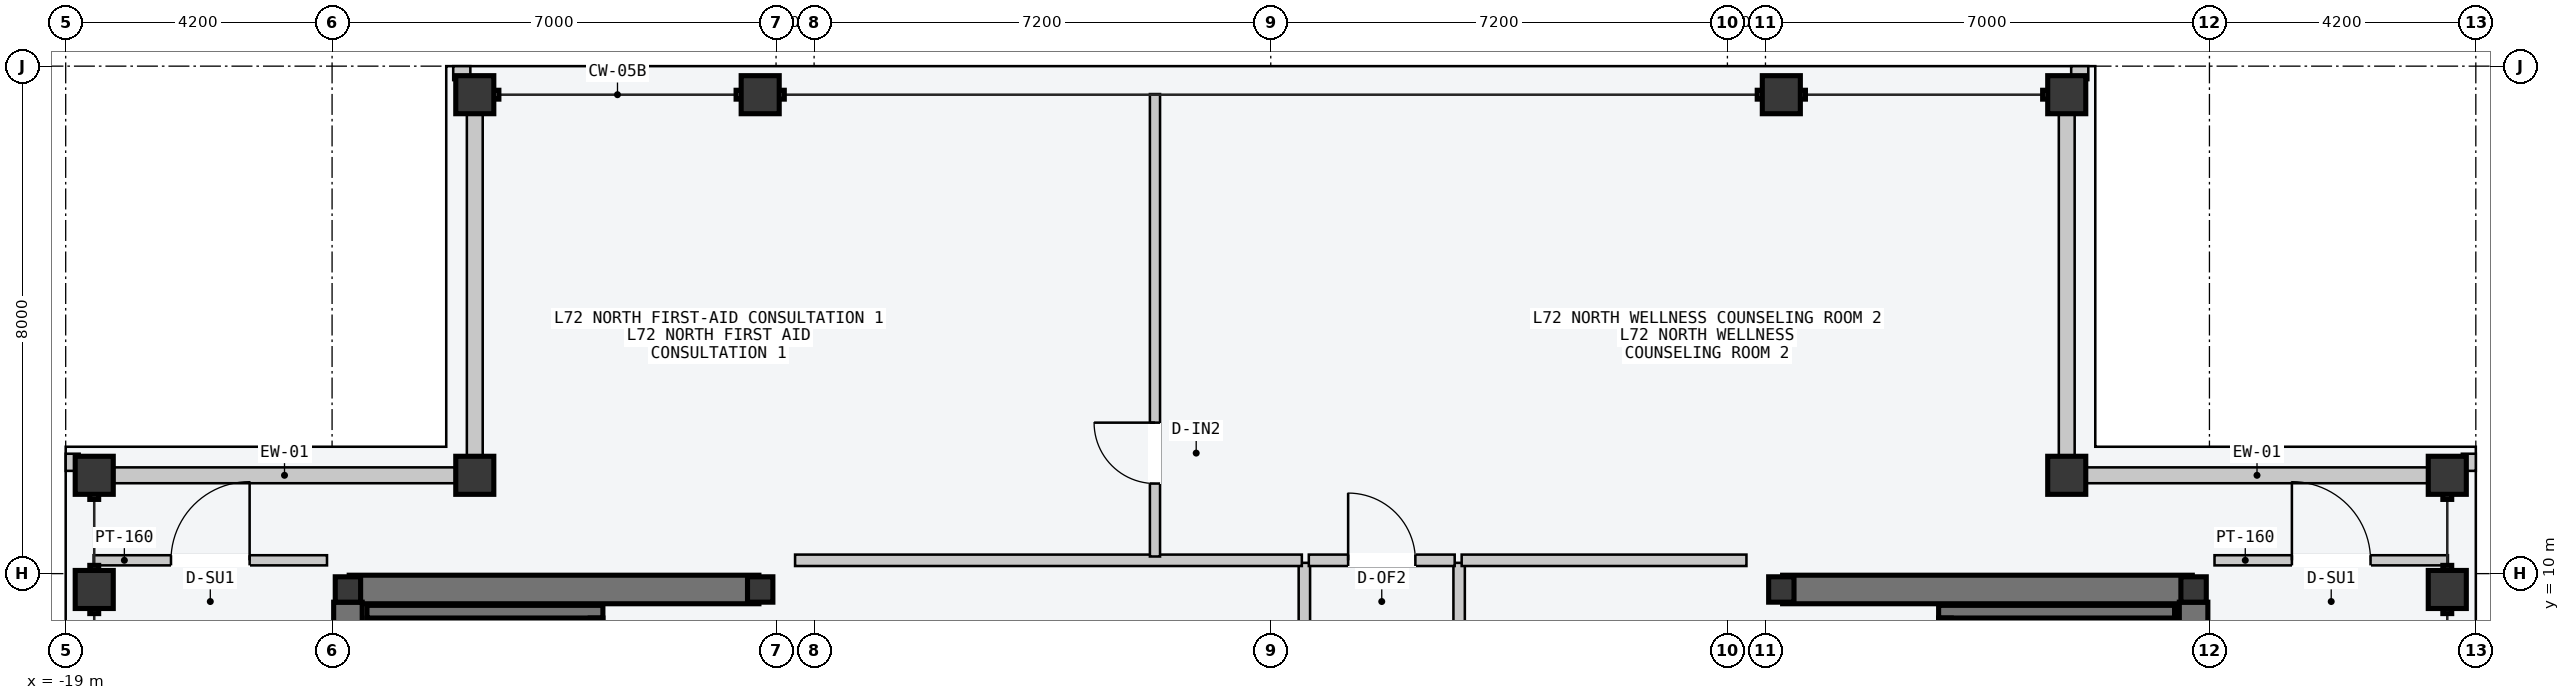
"""IFC4 building model, lengths in metres.
Left out: names, types, materials, properties, quantities, classifications, styles, units other than length and angle.
Written with IfcOpenShell. Run it as: python <this file> out.ifc"""

import sys

from ifc_helpers import new_model, si_unit, direction, frame, frame_2d, origin, origin_2d, place, context, subcontext, project, spatial, rectangle, hollow_rectangle, i_section, extrude, element, fill, save


model = new_model("IFC4")
c1 = context("Model", 3, precision=1e-05, world=origin(), true_north=direction((0.0, 1.0)))
c2 = subcontext(c1, "Body", "Model", "MODEL_VIEW")
j1 = project(units=[si_unit("LENGTHUNIT", "METRE"), si_unit("PLANEANGLEUNIT", "RADIAN")], contexts=[c1])
p1 = place(None, origin())
s1 = spatial("IfcSite", under=j1, at=p1, CompositionType="ELEMENT")
p2 = place(p1, origin())
s2 = spatial("IfcBuilding", under=s1, at=p2, CompositionType="ELEMENT")
p3 = place(p2, frame((0.0, 0.0, 272.4)))
s3 = spatial("IfcBuildingStorey", under=s2, at=p3, CompositionType="ELEMENT", Elevation=272.4)
p4 = place(p3, frame((-14.53, 9.75, -0.2), z_axis=(0.0, 0.0, 1.0), x_axis=(1.0, 0.0, 0.0)))
e1 = element("IfcWall", 1, at=p4, inside=s3, PredefinedType="SHEAR", context=c2, shape_type="SweptSolid", body=[
    extrude(rectangle(XDim=6.46, YDim=0.45, at=frame_2d((3.23, 0.0))), origin(), (0.0, 0.0, 1.0), 3.6),
])
p5 = place(p3, frame((-14.55, 0.2, -0.2), z_axis=(0.0, 0.0, 1.0), x_axis=(0.0, 1.0, 0.0)))
e2 = element("IfcWall", 2, at=p5, inside=s3, PredefinedType="SHEAR", context=c2, shape_type="SweptSolid", body=[
    extrude(rectangle(XDim=9.35, YDim=0.45, at=frame_2d((4.675, 0.0))), origin(), (0.0, 0.0, 1.0), 3.6),
])
p6 = place(p3, frame((8.07, 9.75, -0.2), z_axis=(0.0, 0.0, 1.0), x_axis=(1.0, 0.0, 0.0)))
e3 = element("IfcWall", 3, at=p6, inside=s3, PredefinedType="SHEAR", context=c2, shape_type="SweptSolid", body=[
    extrude(rectangle(XDim=6.46, YDim=0.45, at=frame_2d((3.23, 0.0))), origin(), (0.0, 0.0, 1.0), 3.6),
])
p7 = place(p3, frame((14.55, 0.2, -0.2), z_axis=(0.0, 0.0, 1.0), x_axis=(0.0, 1.0, 0.0)))
e4 = element("IfcWall", 4, at=p7, inside=s3, PredefinedType="SHEAR", context=c2, shape_type="SweptSolid", body=[
    extrude(rectangle(XDim=9.35, YDim=0.45, at=frame_2d((4.675, 0.0))), origin(), (0.0, 0.0, 1.0), 3.6),
])
for number, where, z_axis, x_axis in (
    (5, (-14.15, 1.5, -0.2), (0.0, 0.0, 1.0), (0.0, 1.0, 0.0)),
    (6, (14.15, 1.5, -0.2), (0.0, 0.0, 1.0), (0.0, 1.0, 0.0)),
):
    element("IfcWall", number, at=place(p3, frame(where, z_axis=z_axis, x_axis=x_axis)), inside=s3, PredefinedType="SOLIDWALL", context=c2, shape_type="SweptSolid", body=[
        extrude(rectangle(XDim=7.8, YDim=0.2, at=frame_2d((3.9, 0.0))), origin(), (0.0, 0.0, 1.0), 3.6),
    ])
p8 = place(p3, frame((-14.25, 9.4, -0.2), z_axis=(0.0, 0.0, 1.0), x_axis=(1.0, 0.0, 0.0)))
e7 = element("IfcWall", 7, at=p8, inside=s3, PredefinedType="SOLIDWALL", context=c2, shape_type="SweptSolid", body=[
    extrude(rectangle(XDim=3.72, YDim=0.2, at=frame_2d((1.86, 0.0))), origin(), (0.0, 0.0, 1.0), 3.6),
])
p9 = place(p3, frame((-10.63, 1.5, -0.2), z_axis=(0.0, 0.0, 1.0), x_axis=(0.0, 1.0, 0.0)))
e8 = element("IfcWall", 8, at=p9, inside=s3, PredefinedType="SOLIDWALL", context=c2, shape_type="SweptSolid", body=[
    extrude(rectangle(XDim=7.8, YDim=0.2, at=frame_2d((3.9, 0.0))), origin(), (0.0, 0.0, 1.0), 3.6),
])
p10 = place(p3, frame((10.53, 9.4, -0.2), z_axis=(0.0, 0.0, 1.0), x_axis=(1.0, 0.0, 0.0)))
e9 = element("IfcWall", 9, at=p10, inside=s3, PredefinedType="SOLIDWALL", context=c2, shape_type="SweptSolid", body=[
    extrude(rectangle(XDim=3.72, YDim=0.2, at=frame_2d((1.86, 0.0))), origin(), (0.0, 0.0, 1.0), 3.6),
])
p11 = place(p3, frame((10.63, 1.5, -0.2), z_axis=(0.0, 0.0, 1.0), x_axis=(0.0, 1.0, 0.0)))
e10 = element("IfcWall", 10, at=p11, inside=s3, PredefinedType="SOLIDWALL", context=c2, shape_type="SweptSolid", body=[
    extrude(rectangle(XDim=7.8, YDim=0.2, at=frame_2d((3.9, 0.0))), origin(), (0.0, 0.0, 1.0), 3.6),
])
for number, where, z_axis, x_axis in (
    (11, (-14.55, 9.75, 0.0), (0.0, 0.0, 1.0), (1.0, 0.0, 0.0)),
    (12, (-8.05, 9.75, 0.0), (0.0, 0.0, 1.0), (1.0, 0.0, 0.0)),
    (13, (8.05, 9.75, 0.0), (0.0, 0.0, 1.0), (1.0, 0.0, 0.0)),
    (14, (14.55, 9.75, 0.0), (0.0, 0.0, 1.0), (1.0, 0.0, 0.0)),
):
    element("IfcColumn", number, at=place(p3, frame(where, z_axis=z_axis, x_axis=x_axis)), inside=s3, PredefinedType="COLUMN", context=c2, shape_type="SweptSolid", body=[
        extrude(i_section(OverallWidth=0.4, OverallDepth=0.4, WebThickness=0.013, FlangeThickness=0.021, at=origin_2d()), origin(), (0.0, 0.0, 1.0), 3.6),
    ])
for number, where, z_axis, x_axis in (
    (15, (-12.55, 17.55, 0.0), (0.0, 0.0, 1.0), (1.0, 0.0, 0.0)),
    (16, (-8.05, 17.55, 0.0), (0.0, 0.0, 1.0), (1.0, 0.0, 0.0)),
    (17, (8.05, 17.55, 0.0), (0.0, 0.0, 1.0), (1.0, 0.0, 0.0)),
    (18, (12.55, 17.55, 0.0), (0.0, 0.0, 1.0), (1.0, 0.0, 0.0)),
    (19, (-18.55, 9.75, 0.0), (0.0, 0.0, 1.0), (0.0, 1.0, 0.0)),
    (20, (-18.55, 11.55, 0.0), (0.0, 0.0, 1.0), (0.0, 1.0, 0.0)),
    (21, (18.55, 9.75, 0.0), (0.0, 0.0, 1.0), (0.0, 1.0, 0.0)),
    (22, (18.55, 11.55, 0.0), (0.0, 0.0, 1.0), (0.0, 1.0, 0.0)),
    (23, (-12.55, 11.55, 0.0), (0.0, 0.0, 1.0), (1.0, 0.0, 0.0)),
    (24, (12.55, 11.55, 0.0), (0.0, 0.0, 1.0), (1.0, 0.0, 0.0)),
):
    element("IfcColumn", number, at=place(p3, frame(where, z_axis=z_axis, x_axis=x_axis)), inside=s3, PredefinedType="COLUMN", context=c2, shape_type="SweptSolid", body=[
        extrude(hollow_rectangle(XDim=0.6, YDim=0.6, WallThickness=0.025, at=origin_2d()), origin(), (0.0, 0.0, 1.0), 3.6),
    ])
for number, where, z_axis, x_axis in (
    (25, (-18.24, 11.55, 0.0), (0.0, 0.0, 1.0), (1.0, 0.0, 0.0)),
    (26, (-12.55, 11.86, 0.0), (0.0, 0.0, 1.0), (0.0, 1.0, 0.0)),
    (27, (12.86, 11.55, 0.0), (0.0, 0.0, 1.0), (1.0, 0.0, 0.0)),
    (28, (12.55, 11.86, 0.0), (0.0, 0.0, 1.0), (0.0, 1.0, 0.0)),
):
    element("IfcWall", number, at=place(p3, frame(where, z_axis=z_axis, x_axis=x_axis)), inside=s3, PredefinedType="STANDARD", context=c2, shape_type="SweptSolid", body=[
        extrude(rectangle(XDim=5.38, YDim=0.25, at=frame_2d((2.69, 0.0))), origin(), (0.0, 0.0, 1.0), 2.85),
    ])
for number, where, z_axis, x_axis in (
    (29, (-12.89, 17.89, 0.0), (0.0, 0.0, 1.0), (1.0, 0.0, 0.0)),
    (30, (-18.89, 11.62, 0.0), (0.0, 0.0, 1.0), (0.0, 1.0, 0.0)),
    (31, (12.62, 17.89, 0.0), (0.0, 0.0, 1.0), (1.0, 0.0, 0.0)),
    (32, (18.89, 11.62, 0.0), (0.0, 0.0, 1.0), (0.0, 1.0, 0.0)),
):
    element("IfcWall", number, at=place(p3, frame(where, z_axis=z_axis, x_axis=x_axis)), inside=s3, PredefinedType="PARAPET", context=c2, shape_type="SweptSolid", body=[
        extrude(rectangle(XDim=0.27, YDim=0.22, at=frame_2d((0.135, 0.0))), origin(), (0.0, 0.0, 1.0), 1.2),
    ])
p12 = place(p3, frame((0.53, -3.5, 0.0), z_axis=(0.0, 0.0, 1.0), x_axis=(0.0, 1.0, 0.0)))
e33 = element("IfcWall", 33, at=p12, inside=s3, PredefinedType="PARTITIONING", context=c2, shape_type="SweptSolid", body=[
    extrude(rectangle(XDim=13.67, YDim=0.18, at=frame_2d((6.835, 0.0))), origin(), (0.0, 0.0, 1.0), 3.4),
])
p13 = place(p12, frame((6.1, 0.0, 0.0)))
e34 = element("IfcOpeningElement", 34, at=p13, cuts=e33, PredefinedType="OPENING", context=c2, shape_type="SweptSolid", body=[
    extrude(rectangle(XDim=1.24, YDim=2.24, at=frame_2d((0.62, 1.12))), frame((0.0, 0.1, 0.0), z_axis=(0.0, -1.0, 0.0), x_axis=(1.0, 0.0, 0.0)), (0.0, 0.0, 1.0), 0.2),
])
p14 = place(p12, frame((1.6, 0.0, 0.0)))
e35 = element("IfcOpeningElement", 35, at=p14, cuts=e33, PredefinedType="OPENING", context=c2, shape_type="SweptSolid", body=[
    extrude(rectangle(XDim=0.96, YDim=2.18, at=frame_2d((0.48, 1.09))), frame((0.0, 0.1, 0.0), z_axis=(0.0, -1.0, 0.0), x_axis=(1.0, 0.0, 0.0)), (0.0, 0.0, 1.0), 0.2),
])
p15 = place(p3, frame((-7.5, 10.21, 0.0), z_axis=(0.0, 0.0, 1.0), x_axis=(1.0, 0.0, 0.0)))
e36 = element("IfcWall", 36, at=p15, inside=s3, PredefinedType="PARTITIONING", context=c2, shape_type="SweptSolid", body=[
    extrude(rectangle(XDim=7.99, YDim=0.18, at=frame_2d((3.995, 0.0))), origin(), (0.0, 0.0, 1.0), 3.4),
])
p16 = place(p3, frame((2.97, -3.5, 0.0), z_axis=(0.0, 0.0, 1.0), x_axis=(0.0, 1.0, 0.0)))
e37 = element("IfcWall", 37, at=p16, inside=s3, PredefinedType="PARTITIONING", context=c2, shape_type="SweptSolid", body=[
    extrude(rectangle(XDim=13.67, YDim=0.18, at=frame_2d((6.835, 0.0))), origin(), (0.0, 0.0, 1.0), 3.4),
])
p17 = place(p16, frame((6.1, 0.0, 0.0)))
e38 = element("IfcOpeningElement", 38, at=p17, cuts=e37, PredefinedType="OPENING", context=c2, shape_type="SweptSolid", body=[
    extrude(rectangle(XDim=1.24, YDim=2.24, at=frame_2d((0.62, 1.12))), frame((0.0, 0.1, 0.0), z_axis=(0.0, -1.0, 0.0), x_axis=(1.0, 0.0, 0.0)), (0.0, 0.0, 1.0), 0.2),
])
p18 = place(p16, frame((1.6, 0.0, 0.0)))
e39 = element("IfcOpeningElement", 39, at=p18, cuts=e37, PredefinedType="OPENING", context=c2, shape_type="SweptSolid", body=[
    extrude(rectangle(XDim=0.96, YDim=2.18, at=frame_2d((0.48, 1.09))), frame((0.0, 0.1, 0.0), z_axis=(0.0, -1.0, 0.0), x_axis=(1.0, 0.0, 0.0)), (0.0, 0.0, 1.0), 0.2),
])
p19 = place(p3, frame((3.01, 10.21, 0.0), z_axis=(0.0, 0.0, 1.0), x_axis=(1.0, 0.0, 0.0)))
e40 = element("IfcWall", 40, at=p19, inside=s3, PredefinedType="PARTITIONING", context=c2, shape_type="SweptSolid", body=[
    extrude(rectangle(XDim=4.49, YDim=0.18, at=frame_2d((2.245, 0.0))), origin(), (0.0, 0.0, 1.0), 3.4),
])
p20 = place(p3, frame((-1.826, 10.27, 0.0), z_axis=(0.0, 0.0, 1.0), x_axis=(0.0, 1.0, 0.0)))
e41 = element("IfcWall", 41, at=p20, inside=s3, PredefinedType="PARTITIONING", context=c2, shape_type="SweptSolid", body=[
    extrude(rectangle(XDim=7.29, YDim=0.16, at=frame_2d((3.645, 0.0))), origin(), (0.0, 0.0, 1.0), 3.4),
])
p21 = place(p20, frame((1.15, 0.0, 0.0)))
e42 = element("IfcOpeningElement", 42, at=p21, cuts=e41, PredefinedType="OPENING", context=c2, shape_type="SweptSolid", body=[
    extrude(rectangle(XDim=0.96, YDim=2.18, at=frame_2d((0.48, 1.09))), frame((0.0, 0.09, 0.0), z_axis=(0.0, -1.0, 0.0), x_axis=(1.0, 0.0, 0.0)), (0.0, 0.0, 1.0), 0.18),
])
p22 = place(p3, frame((0.6, 10.21, 0.0), z_axis=(0.0, 0.0, 1.0), x_axis=(1.0, 0.0, 0.0)))
e43 = element("IfcWall", 43, at=p22, inside=s3, PredefinedType="PARTITIONING", context=c2, shape_type="SweptSolid", body=[
    extrude(rectangle(XDim=2.3, YDim=0.18, at=frame_2d((1.15, 0.0))), origin(), (0.0, 0.0, 1.0), 3.4),
])
p23 = place(p22, frame((0.62, 0.0, 0.0)))
e44 = element("IfcOpeningElement", 44, at=p23, cuts=e43, PredefinedType="OPENING", context=c2, shape_type="SweptSolid", body=[
    extrude(rectangle(XDim=1.06, YDim=2.2, at=frame_2d((0.53, 1.1))), frame((0.0, 0.1, 0.0), z_axis=(0.0, -1.0, 0.0), x_axis=(1.0, 0.0, 0.0)), (0.0, 0.0, 1.0), 0.2),
])
p24 = place(p3, frame((-18.56, 10.21, 0.0), z_axis=(0.0, 0.0, 1.0), x_axis=(1.0, 0.0, 0.0)))
e45 = element("IfcWall", 45, at=p24, inside=s3, PredefinedType="PARTITIONING", context=c2, shape_type="SweptSolid", body=[
    extrude(rectangle(XDim=3.68, YDim=0.16, at=frame_2d((1.84, 0.0))), origin(), (0.0, 0.0, 1.0), 3.4),
])
p25 = place(p24, frame((1.22, 0.0, 0.0)))
e46 = element("IfcOpeningElement", 46, at=p25, cuts=e45, PredefinedType="OPENING", context=c2, shape_type="SweptSolid", body=[
    extrude(rectangle(XDim=1.24, YDim=2.24, at=frame_2d((0.62, 1.12))), frame((0.0, 0.09, 0.0), z_axis=(0.0, -1.0, 0.0), x_axis=(1.0, 0.0, 0.0)), (0.0, 0.0, 1.0), 0.18),
])
p26 = place(p3, frame((14.88, 10.21, 0.0), z_axis=(0.0, 0.0, 1.0), x_axis=(1.0, 0.0, 0.0)))
e47 = element("IfcWall", 47, at=p26, inside=s3, PredefinedType="PARTITIONING", context=c2, shape_type="SweptSolid", body=[
    extrude(rectangle(XDim=3.68, YDim=0.16, at=frame_2d((1.84, 0.0))), origin(), (0.0, 0.0, 1.0), 3.4),
])
p27 = place(p26, frame((1.22, 0.0, 0.0)))
e48 = element("IfcOpeningElement", 48, at=p27, cuts=e47, PredefinedType="OPENING", context=c2, shape_type="SweptSolid", body=[
    extrude(rectangle(XDim=1.24, YDim=2.24, at=frame_2d((0.62, 1.12))), frame((0.0, 0.09, 0.0), z_axis=(0.0, -1.0, 0.0), x_axis=(1.0, 0.0, 0.0)), (0.0, 0.0, 1.0), 0.18),
])
p28 = place(p21, origin())
e49 = element("IfcDoor", 49, at=p28, inside=s3, OperationType="SINGLE_SWING_RIGHT", PredefinedType="DOOR", context=c2, shape_type="SweptSolid", body=[
    extrude(rectangle(XDim=0.96, YDim=2.18, at=frame_2d((0.48, 1.09))), frame((0.0, 0.025, 0.0), z_axis=(0.0, -1.0, 0.0), x_axis=(1.0, 0.0, 0.0)), (0.0, 0.0, 1.0), 0.05),
])
fill(e42, e49)
p29 = place(p23, origin())
e50 = element("IfcDoor", 50, at=p29, inside=s3, OperationType="SINGLE_SWING_LEFT", PredefinedType="DOOR", context=c2, shape_type="SweptSolid", body=[
    extrude(rectangle(XDim=1.06, YDim=2.2, at=frame_2d((0.53, 1.1))), frame((0.0, 0.025, 0.0), z_axis=(0.0, -1.0, 0.0), x_axis=(1.0, 0.0, 0.0)), (0.0, 0.0, 1.0), 0.05),
])
fill(e44, e50)
p30 = place(p25, origin())
e51 = element("IfcDoor", 51, at=p30, inside=s3, OperationType="SINGLE_SWING_RIGHT", PredefinedType="DOOR", context=c2, shape_type="SweptSolid", body=[
    extrude(rectangle(XDim=1.24, YDim=2.24, at=frame_2d((0.62, 1.12))), frame((0.0, 0.025, 0.0), z_axis=(0.0, -1.0, 0.0), x_axis=(1.0, 0.0, 0.0)), (0.0, 0.0, 1.0), 0.05),
])
fill(e46, e51)
p31 = place(p27, origin())
e52 = element("IfcDoor", 52, at=p31, inside=s3, OperationType="SINGLE_SWING_LEFT", PredefinedType="DOOR", context=c2, shape_type="SweptSolid", body=[
    extrude(rectangle(XDim=1.24, YDim=2.24, at=frame_2d((0.62, 1.12))), frame((0.0, 0.025, 0.0), z_axis=(0.0, -1.0, 0.0), x_axis=(1.0, 0.0, 0.0)), (0.0, 0.0, 1.0), 0.05),
])
fill(e48, e52)
save(model, sys.argv[1])
